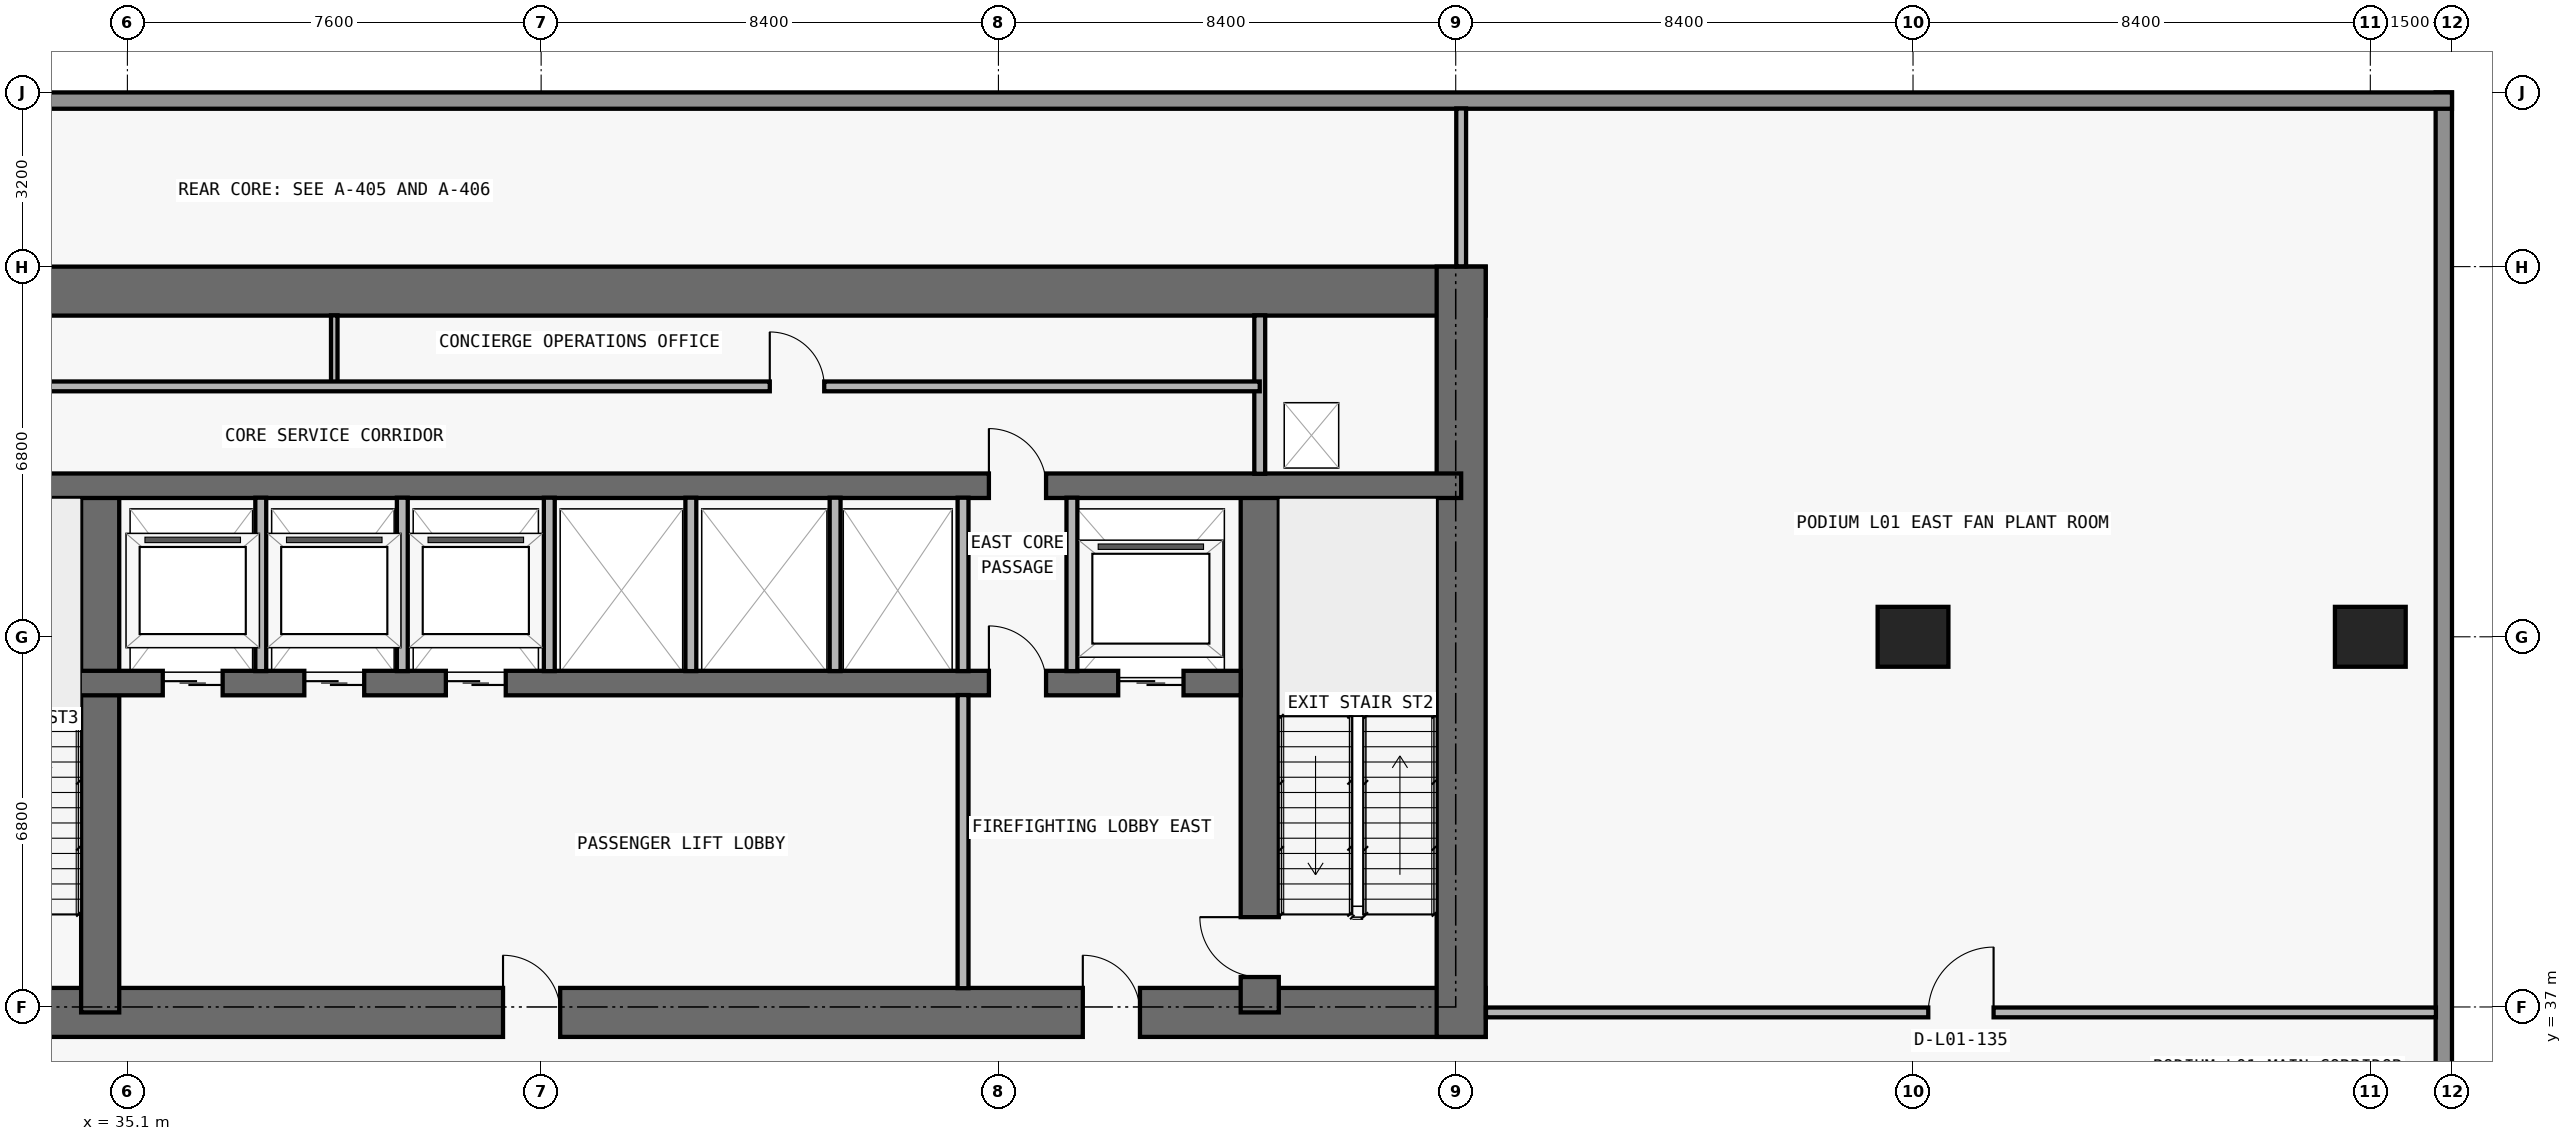
"""IFC4 building model, lengths in metres.
Left out: names, types, materials, properties, quantities, classifications, styles, units other than length and angle.
Written with IfcOpenShell. Run it as: python <this file> out.ifc"""

import sys

from ifc_helpers import new_model, si_unit, direction, frame, frame_2d, origin, origin_2d, place, context, subcontext, project, spatial, rectangle, extrude, element, fill, save


model = new_model("IFC4")
c1 = context("Model", 3, precision=1e-05, world=origin(), true_north=direction((0.0, 1.0)))
c2 = subcontext(c1, "Body", "Model", "MODEL_VIEW")
j1 = project(units=[si_unit("LENGTHUNIT", "METRE"), si_unit("PLANEANGLEUNIT", "RADIAN")], contexts=[c1])
p1 = place(None, origin())
s1 = spatial("IfcSite", under=j1, at=p1, CompositionType="ELEMENT")
p2 = place(p1, origin())
s2 = spatial("IfcBuilding", under=s1, at=p2, CompositionType="ELEMENT")
p3 = place(p2, frame((0.0, 0.0, 5.4)))
s3 = spatial("IfcBuildingStorey", under=s2, at=p3, CompositionType="ELEMENT", Elevation=5.4)
for number, where, z_axis, x_axis in (
    (1, (67.9, 43.8, 0.0), (0.0, 0.0, 1.0), (1.0, 0.0, 0.0)),
    (2, (76.3, 43.8, 0.0), (0.0, 0.0, 1.0), (1.0, 0.0, 0.0)),
):
    element("IfcColumn", number, at=place(p3, frame(where, z_axis=z_axis, x_axis=x_axis)), inside=s3, PredefinedType="COLUMN", context=c2, shape_type="SweptSolid", body=[
        extrude(rectangle(XDim=1.3, YDim=1.1, at=origin_2d()), origin(), (0.0, 0.0, 1.0), 4.5),
    ])
p4 = place(p3, frame((17.75, 36.9, 0.0), z_axis=(0.0, 0.0, 1.0), x_axis=(1.0, 0.0, 0.0)))
e3 = element("IfcWall", 3, at=p4, inside=s3, PredefinedType="SHEAR", context=c2, shape_type="SweptSolid", body=[
    extrude(rectangle(XDim=42.3, YDim=0.9, at=frame_2d((21.15, 0.0))), origin(), (0.0, 0.0, 1.0), 4.5),
])
p5 = place(p4, frame((14.55, 0.0, 0.0)))
e4 = element("IfcOpeningElement", 4, at=p5, cuts=e3, PredefinedType="OPENING", context=c2, shape_type="SweptSolid", body=[
    extrude(rectangle(XDim=1.1, YDim=2.15, at=frame_2d((0.55, 1.075))), frame((0.0, 0.46, 0.0), z_axis=(0.0, -1.0, 0.0), x_axis=(1.0, 0.0, 0.0)), (0.0, 0.0, 1.0), 0.92),
])
p6 = place(p4, frame((6.4, 0.0, 0.0)))
e5 = element("IfcOpeningElement", 5, at=p6, cuts=e3, PredefinedType="OPENING", context=c2, shape_type="SweptSolid", body=[
    extrude(rectangle(XDim=1.05, YDim=2.15, at=frame_2d((0.525, 1.075))), frame((0.0, 0.46, 0.0), z_axis=(0.0, -1.0, 0.0), x_axis=(1.0, 0.0, 0.0)), (0.0, 0.0, 1.0), 0.92),
])
p7 = place(p4, frame((34.9, 0.0, 0.0)))
e6 = element("IfcOpeningElement", 6, at=p7, cuts=e3, PredefinedType="OPENING", context=c2, shape_type="SweptSolid", body=[
    extrude(rectangle(XDim=1.05, YDim=2.15, at=frame_2d((0.525, 1.075))), frame((0.0, 0.46, 0.0), z_axis=(0.0, -1.0, 0.0), x_axis=(1.0, 0.0, 0.0)), (0.0, 0.0, 1.0), 0.92),
])
p8 = place(p4, frame((11.012, 0.0, 0.0)))
e7 = element("IfcOpeningElement", 7, at=p8, cuts=e3, PredefinedType="OPENING", context=c2, shape_type="SweptSolid", body=[
    extrude(rectangle(XDim=1.05, YDim=2.15, at=frame_2d((0.525, 1.075))), frame((0.0, 0.46, 0.0), z_axis=(0.0, -1.0, 0.0), x_axis=(1.0, 0.0, 0.0)), (0.0, 0.0, 1.0), 0.92),
])
p9 = place(p4, frame((24.25, 0.0, 0.0)))
e8 = element("IfcOpeningElement", 8, at=p9, cuts=e3, PredefinedType="OPENING", context=c2, shape_type="SweptSolid", body=[
    extrude(rectangle(XDim=1.05, YDim=2.15, at=frame_2d((0.525, 1.075))), frame((0.0, 0.46, 0.0), z_axis=(0.0, -1.0, 0.0), x_axis=(1.0, 0.0, 0.0)), (0.0, 0.0, 1.0), 0.92),
])
p10 = place(p3, frame((17.75, 50.15, 0.0), z_axis=(0.0, 0.0, 1.0), x_axis=(1.0, 0.0, 0.0)))
e9 = element("IfcWall", 9, at=p10, inside=s3, PredefinedType="SHEAR", context=c2, shape_type="SweptSolid", body=[
    extrude(rectangle(XDim=42.3, YDim=0.9, at=frame_2d((21.15, 0.0))), origin(), (0.0, 0.0, 1.0), 4.5),
])
p11 = place(p3, frame((59.6, 36.45, 0.0), z_axis=(0.0, 0.0, 1.0), x_axis=(0.0, 1.0, 0.0)))
e10 = element("IfcWall", 10, at=p11, inside=s3, PredefinedType="SHEAR", context=c2, shape_type="SweptSolid", body=[
    extrude(rectangle(XDim=14.15, YDim=0.9, at=frame_2d((7.075, 0.0))), origin(), (0.0, 0.0, 1.0), 4.5),
])
p12 = place(p3, frame((55.9, 36.9, 0.0), z_axis=(0.0, 0.0, 1.0), x_axis=(0.0, 1.0, 0.0)))
e11 = element("IfcWall", 11, at=p12, inside=s3, PredefinedType="SHEAR", context=c2, shape_type="SweptSolid", body=[
    extrude(rectangle(XDim=9.675, YDim=0.7, at=frame_2d((4.837, 0.0))), origin(), (0.0, 0.0, 1.0), 4.5),
])
p13 = place(p12, frame((0.65, 0.0, 0.0)))
e12 = element("IfcOpeningElement", 12, at=p13, cuts=e11, PredefinedType="OPENING", context=c2, shape_type="SweptSolid", body=[
    extrude(rectangle(XDim=1.1, YDim=2.15, at=frame_2d((0.55, 1.075))), frame((0.0, 0.36, 0.0), z_axis=(0.0, -1.0, 0.0), x_axis=(1.0, 0.0, 0.0)), (0.0, 0.0, 1.0), 0.72),
])
p14 = place(p3, frame((34.6, 36.9, 0.0), z_axis=(0.0, 0.0, 1.0), x_axis=(0.0, 1.0, 0.0)))
e13 = element("IfcWall", 13, at=p14, inside=s3, PredefinedType="SHEAR", context=c2, shape_type="SweptSolid", body=[
    extrude(rectangle(XDim=9.675, YDim=0.7, at=frame_2d((4.837, 0.0))), origin(), (0.0, 0.0, 1.0), 4.5),
])
p15 = place(p3, frame((22.25, 42.95, 0.0), z_axis=(0.0, 0.0, 1.0), x_axis=(1.0, 0.0, 0.0)))
e14 = element("IfcWall", 14, at=p15, inside=s3, PredefinedType="SHEAR", context=c2, shape_type="SweptSolid", body=[
    extrude(rectangle(XDim=33.3, YDim=0.45, at=frame_2d((16.65, 0.0))), origin(), (0.0, 0.0, 1.0), 4.5),
])
p16 = place(p15, frame((1.05, 0.0, 0.0)))
e15 = element("IfcOpeningElement", 15, at=p16, cuts=e14, PredefinedType="OPENING", context=c2, shape_type="SweptSolid", body=[
    extrude(rectangle(XDim=1.2, YDim=2.2, at=frame_2d((0.6, 1.1))), frame((0.0, 0.235, 0.0), z_axis=(0.0, -1.0, 0.0), x_axis=(1.0, 0.0, 0.0)), (0.0, 0.0, 1.0), 0.47),
])
p17 = place(p15, frame((31.05, 0.0, 0.0)))
e16 = element("IfcOpeningElement", 16, at=p17, cuts=e14, PredefinedType="OPENING", context=c2, shape_type="SweptSolid", body=[
    extrude(rectangle(XDim=1.2, YDim=2.2, at=frame_2d((0.6, 1.1))), frame((0.0, 0.235, 0.0), z_axis=(0.0, -1.0, 0.0), x_axis=(1.0, 0.0, 0.0)), (0.0, 0.0, 1.0), 0.47),
])
p18 = place(p15, frame((13.5, 0.0, 0.0)))
e17 = element("IfcOpeningElement", 17, at=p18, cuts=e14, PredefinedType="OPENING", context=c2, shape_type="SweptSolid", body=[
    extrude(rectangle(XDim=1.1, YDim=2.2, at=frame_2d((0.55, 1.1))), frame((0.0, 0.235, 0.0), z_axis=(0.0, -1.0, 0.0), x_axis=(1.0, 0.0, 0.0)), (0.0, 0.0, 1.0), 0.47),
])
p19 = place(p15, frame((16.1, 0.0, 0.0)))
e18 = element("IfcOpeningElement", 18, at=p19, cuts=e14, PredefinedType="OPENING", context=c2, shape_type="SweptSolid", body=[
    extrude(rectangle(XDim=1.1, YDim=2.2, at=frame_2d((0.55, 1.1))), frame((0.0, 0.235, 0.0), z_axis=(0.0, -1.0, 0.0), x_axis=(1.0, 0.0, 0.0)), (0.0, 0.0, 1.0), 0.47),
])
p20 = place(p15, frame((18.7, 0.0, 0.0)))
e19 = element("IfcOpeningElement", 19, at=p20, cuts=e14, PredefinedType="OPENING", context=c2, shape_type="SweptSolid", body=[
    extrude(rectangle(XDim=1.1, YDim=2.2, at=frame_2d((0.55, 1.1))), frame((0.0, 0.235, 0.0), z_axis=(0.0, -1.0, 0.0), x_axis=(1.0, 0.0, 0.0)), (0.0, 0.0, 1.0), 0.47),
])
p21 = place(p15, frame((3.625, 0.0, 0.0)))
e20 = element("IfcOpeningElement", 20, at=p21, cuts=e14, PredefinedType="OPENING", context=c2, shape_type="SweptSolid", body=[
    extrude(rectangle(XDim=1.05, YDim=2.15, at=frame_2d((0.525, 1.075))), frame((0.0, 0.235, 0.0), z_axis=(0.0, -1.0, 0.0), x_axis=(1.0, 0.0, 0.0)), (0.0, 0.0, 1.0), 0.47),
])
p22 = place(p15, frame((28.675, 0.0, 0.0)))
e21 = element("IfcOpeningElement", 21, at=p22, cuts=e14, PredefinedType="OPENING", context=c2, shape_type="SweptSolid", body=[
    extrude(rectangle(XDim=1.05, YDim=2.15, at=frame_2d((0.525, 1.075))), frame((0.0, 0.235, 0.0), z_axis=(0.0, -1.0, 0.0), x_axis=(1.0, 0.0, 0.0)), (0.0, 0.0, 1.0), 0.47),
])
p23 = place(p3, frame((18.2, 46.575, 0.0), z_axis=(0.0, 0.0, 1.0), x_axis=(1.0, 0.0, 0.0)))
e22 = element("IfcWall", 22, at=p23, inside=s3, PredefinedType="SHEAR", context=c2, shape_type="SweptSolid", body=[
    extrude(rectangle(XDim=41.4, YDim=0.45, at=frame_2d((20.7, 0.0))), origin(), (0.0, 0.0, 1.0), 4.5),
])
p24 = place(p23, frame((7.675, 0.0, 0.0)))
e23 = element("IfcOpeningElement", 23, at=p24, cuts=e22, PredefinedType="OPENING", context=c2, shape_type="SweptSolid", body=[
    extrude(rectangle(XDim=1.05, YDim=2.15, at=frame_2d((0.525, 1.075))), frame((0.0, 0.235, 0.0), z_axis=(0.0, -1.0, 0.0), x_axis=(1.0, 0.0, 0.0)), (0.0, 0.0, 1.0), 0.47),
])
p25 = place(p23, frame((32.725, 0.0, 0.0)))
e24 = element("IfcOpeningElement", 24, at=p25, cuts=e22, PredefinedType="OPENING", context=c2, shape_type="SweptSolid", body=[
    extrude(rectangle(XDim=1.05, YDim=2.15, at=frame_2d((0.525, 1.075))), frame((0.0, 0.235, 0.0), z_axis=(0.0, -1.0, 0.0), x_axis=(1.0, 0.0, 0.0)), (0.0, 0.0, 1.0), 0.47),
])
p26 = place(p3, frame((77.65, 53.8, 0.0), z_axis=(0.0, 0.0, 1.0), x_axis=(0.0, -1.0, 0.0)))
e25 = element("IfcWall", 25, at=p26, inside=s3, PredefinedType="STANDARD", context=c2, shape_type="SweptSolid", body=[
    extrude(rectangle(XDim=26.9, YDim=0.3, at=frame_2d((13.45, 0.0))), origin(), (0.0, 0.0, 1.0), 4.5),
])
p27 = place(p3, frame((0.0, 53.65, 0.0), z_axis=(0.0, 0.0, 1.0), x_axis=(1.0, 0.0, 0.0)))
e26 = element("IfcWall", 26, at=p27, inside=s3, PredefinedType="STANDARD", context=c2, shape_type="SweptSolid", body=[
    extrude(rectangle(XDim=77.8, YDim=0.3, at=frame_2d((38.9, 0.0))), origin(), (0.0, 0.0, 1.0), 4.5),
])
p28 = place(p3, frame((37.55, 43.17, 0.0), z_axis=(0.0, 0.0, 1.0), x_axis=(0.0, 1.0, 0.0)))
e27 = element("IfcWall", 27, at=p28, inside=s3, PredefinedType="PARTITIONING", context=c2, shape_type="SweptSolid", body=[
    extrude(rectangle(XDim=3.185, YDim=0.2, at=frame_2d((1.593, 0.0))), origin(), (0.0, 0.0, 1.0), 4.5),
])
p29 = place(p3, frame((38.9, 48.4, 0.0), z_axis=(0.0, 0.0, 1.0), x_axis=(0.0, 1.0, 0.0)))
e28 = element("IfcWall", 28, at=p29, inside=s3, PredefinedType="PARTITIONING", context=c2, shape_type="SweptSolid", body=[
    extrude(rectangle(XDim=1.305, YDim=0.12, at=frame_2d((0.653, 0.0))), origin(), (0.0, 0.0, 1.0), 4.5),
])
for number, where, z_axis, x_axis in (
    (29, (40.15, 43.17, 0.0), (0.0, 0.0, 1.0), (0.0, 1.0, 0.0)),
    (30, (42.85, 43.17, 0.0), (0.0, 0.0, 1.0), (0.0, 1.0, 0.0)),
    (31, (45.45, 43.17, 0.0), (0.0, 0.0, 1.0), (0.0, 1.0, 0.0)),
    (32, (48.1, 43.17, 0.0), (0.0, 0.0, 1.0), (0.0, 1.0, 0.0)),
):
    element("IfcWall", number, at=place(p3, frame(where, z_axis=z_axis, x_axis=x_axis)), inside=s3, PredefinedType="PARTITIONING", context=c2, shape_type="SweptSolid", body=[
        extrude(rectangle(XDim=3.185, YDim=0.2, at=frame_2d((1.593, 0.0))), origin(), (0.0, 0.0, 1.0), 4.5),
    ])
p30 = place(p3, frame((50.45, 37.345, 0.0), z_axis=(0.0, 0.0, 1.0), x_axis=(0.0, 1.0, 0.0)))
e33 = element("IfcWall", 33, at=p30, inside=s3, PredefinedType="PARTITIONING", context=c2, shape_type="SweptSolid", body=[
    extrude(rectangle(XDim=5.385, YDim=0.2, at=frame_2d((2.692, 0.0))), origin(), (0.0, 0.0, 1.0), 4.5),
])
for number, where, z_axis, x_axis in (
    (34, (50.45, 43.17, 0.0), (0.0, 0.0, 1.0), (0.0, 1.0, 0.0)),
    (35, (52.45, 43.17, 0.0), (0.0, 0.0, 1.0), (0.0, 1.0, 0.0)),
):
    element("IfcWall", number, at=place(p3, frame(where, z_axis=z_axis, x_axis=x_axis)), inside=s3, PredefinedType="PARTITIONING", context=c2, shape_type="SweptSolid", body=[
        extrude(rectangle(XDim=3.185, YDim=0.2, at=frame_2d((1.593, 0.0))), origin(), (0.0, 0.0, 1.0), 4.5),
    ])
p31 = place(p3, frame((55.9, 46.795, 0.0), z_axis=(0.0, 0.0, 1.0), x_axis=(0.0, 1.0, 0.0)))
e36 = element("IfcWall", 36, at=p31, inside=s3, PredefinedType="PARTITIONING", context=c2, shape_type="SweptSolid", body=[
    extrude(rectangle(XDim=2.91, YDim=0.2, at=frame_2d((1.455, 0.0))), origin(), (0.0, 0.0, 1.0), 4.5),
])
p32 = place(p3, frame((59.6, 50.605, 0.0), z_axis=(0.0, 0.0, 1.0), x_axis=(0.0, 1.0, 0.0)))
e37 = element("IfcWall", 37, at=p32, inside=s3, PredefinedType="PARTITIONING", context=c2, shape_type="SweptSolid", body=[
    extrude(rectangle(XDim=2.9, YDim=0.18, at=frame_2d((1.45, 0.0))), origin(), (0.0, 0.0, 1.0), 4.5),
])
p33 = place(p3, frame((60.055, 36.9, 0.0), z_axis=(0.0, 0.0, 1.0), x_axis=(1.0, 0.0, 0.0)))
e38 = element("IfcWall", 38, at=p33, inside=s3, PredefinedType="PARTITIONING", context=c2, shape_type="SweptSolid", body=[
    extrude(rectangle(XDim=17.45, YDim=0.18, at=frame_2d((8.725, 0.0))), origin(), (0.0, 0.0, 1.0), 4.5),
])
p34 = place(p33, frame((8.125, 0.0, 0.0)))
e39 = element("IfcOpeningElement", 39, at=p34, cuts=e38, PredefinedType="OPENING", context=c2, shape_type="SweptSolid", body=[
    extrude(rectangle(XDim=1.2, YDim=2.2, at=frame_2d((0.6, 1.1))), frame((0.0, 0.1, 0.0), z_axis=(0.0, -1.0, 0.0), x_axis=(1.0, 0.0, 0.0)), (0.0, 0.0, 1.0), 0.2),
])
p35 = place(p3, frame((21.9, 48.4, 0.0), z_axis=(0.0, 0.0, 1.0), x_axis=(1.0, 0.0, 0.0)))
e40 = element("IfcWall", 40, at=p35, inside=s3, PredefinedType="PARTITIONING", context=c2, shape_type="SweptSolid", body=[
    extrude(rectangle(XDim=34.0, YDim=0.18, at=frame_2d((17.0, 0.0))), origin(), (0.0, 0.0, 1.0), 4.5),
])
p36 = place(p35, frame((8.0, 0.0, 0.0)))
e41 = element("IfcOpeningElement", 41, at=p36, cuts=e40, PredefinedType="OPENING", context=c2, shape_type="SweptSolid", body=[
    extrude(rectangle(XDim=1.0, YDim=2.2, at=frame_2d((0.5, 1.1))), frame((0.0, 0.1, 0.0), z_axis=(0.0, -1.0, 0.0), x_axis=(1.0, 0.0, 0.0)), (0.0, 0.0, 1.0), 0.2),
])
p37 = place(p35, frame((25.0, 0.0, 0.0)))
e42 = element("IfcOpeningElement", 42, at=p37, cuts=e40, PredefinedType="OPENING", context=c2, shape_type="SweptSolid", body=[
    extrude(rectangle(XDim=1.0, YDim=2.2, at=frame_2d((0.5, 1.1))), frame((0.0, 0.1, 0.0), z_axis=(0.0, -1.0, 0.0), x_axis=(1.0, 0.0, 0.0)), (0.0, 0.0, 1.0), 0.2),
])
p38 = place(p17, origin())
e43 = element("IfcDoor", 43, at=p38, inside=s3, OperationType="DOUBLE_DOOR_SLIDING", PredefinedType="DOOR", context=c2, shape_type="SweptSolid", body=[
    extrude(rectangle(XDim=1.2, YDim=2.2, at=frame_2d((0.6, 1.1))), frame((0.0, 0.025, 0.0), z_axis=(0.0, -1.0, 0.0), x_axis=(1.0, 0.0, 0.0)), (0.0, 0.0, 1.0), 0.05),
])
fill(e16, e43)
p39 = place(p18, origin())
e44 = element("IfcDoor", 44, at=p39, inside=s3, OperationType="DOUBLE_DOOR_SLIDING", PredefinedType="DOOR", context=c2, shape_type="SweptSolid", body=[
    extrude(rectangle(XDim=1.1, YDim=2.2, at=frame_2d((0.55, 1.1))), frame((0.0, 0.025, 0.0), z_axis=(0.0, -1.0, 0.0), x_axis=(1.0, 0.0, 0.0)), (0.0, 0.0, 1.0), 0.05),
])
fill(e17, e44)
p40 = place(p19, origin())
e45 = element("IfcDoor", 45, at=p40, inside=s3, OperationType="DOUBLE_DOOR_SLIDING", PredefinedType="DOOR", context=c2, shape_type="SweptSolid", body=[
    extrude(rectangle(XDim=1.1, YDim=2.2, at=frame_2d((0.55, 1.1))), frame((0.0, 0.025, 0.0), z_axis=(0.0, -1.0, 0.0), x_axis=(1.0, 0.0, 0.0)), (0.0, 0.0, 1.0), 0.05),
])
fill(e18, e45)
p41 = place(p20, origin())
e46 = element("IfcDoor", 46, at=p41, inside=s3, OperationType="DOUBLE_DOOR_SLIDING", PredefinedType="DOOR", context=c2, shape_type="SweptSolid", body=[
    extrude(rectangle(XDim=1.1, YDim=2.2, at=frame_2d((0.55, 1.1))), frame((0.0, 0.025, 0.0), z_axis=(0.0, -1.0, 0.0), x_axis=(1.0, 0.0, 0.0)), (0.0, 0.0, 1.0), 0.05),
])
fill(e19, e46)
p42 = place(p7, origin())
e47 = element("IfcDoor", 47, at=p42, inside=s3, OperationType="SINGLE_SWING_LEFT", PredefinedType="DOOR", context=c2, shape_type="SweptSolid", body=[
    extrude(rectangle(XDim=1.05, YDim=2.15, at=frame_2d((0.525, 1.075))), frame((0.0, 0.025, 0.0), z_axis=(0.0, -1.0, 0.0), x_axis=(1.0, 0.0, 0.0)), (0.0, 0.0, 1.0), 0.05),
])
fill(e6, e47)
p43 = place(p13, origin())
e48 = element("IfcDoor", 48, at=p43, inside=s3, OperationType="SINGLE_SWING_RIGHT", PredefinedType="DOOR", context=c2, shape_type="SweptSolid", body=[
    extrude(rectangle(XDim=1.1, YDim=2.15, at=frame_2d((0.55, 1.075))), frame((0.0, 0.025, 0.0), z_axis=(0.0, -1.0, 0.0), x_axis=(1.0, 0.0, 0.0)), (0.0, 0.0, 1.0), 0.05),
])
fill(e12, e48)
p44 = place(p22, origin())
e49 = element("IfcDoor", 49, at=p44, inside=s3, OperationType="SINGLE_SWING_LEFT", PredefinedType="DOOR", context=c2, shape_type="SweptSolid", body=[
    extrude(rectangle(XDim=1.05, YDim=2.15, at=frame_2d((0.525, 1.075))), frame((0.0, 0.025, 0.0), z_axis=(0.0, -1.0, 0.0), x_axis=(1.0, 0.0, 0.0)), (0.0, 0.0, 1.0), 0.05),
])
fill(e21, e49)
p45 = place(p9, origin())
e50 = element("IfcDoor", 50, at=p45, inside=s3, OperationType="SINGLE_SWING_LEFT", PredefinedType="DOOR", context=c2, shape_type="SweptSolid", body=[
    extrude(rectangle(XDim=1.05, YDim=2.15, at=frame_2d((0.525, 1.075))), frame((0.0, 0.025, 0.0), z_axis=(0.0, -1.0, 0.0), x_axis=(1.0, 0.0, 0.0)), (0.0, 0.0, 1.0), 0.05),
])
fill(e8, e50)
p46 = place(p25, origin())
e51 = element("IfcDoor", 51, at=p46, inside=s3, OperationType="SINGLE_SWING_LEFT", PredefinedType="DOOR", context=c2, shape_type="SweptSolid", body=[
    extrude(rectangle(XDim=1.05, YDim=2.15, at=frame_2d((0.525, 1.075))), frame((0.0, 0.025, 0.0), z_axis=(0.0, -1.0, 0.0), x_axis=(1.0, 0.0, 0.0)), (0.0, 0.0, 1.0), 0.05),
])
fill(e24, e51)
p47 = place(p37, origin())
e52 = element("IfcDoor", 52, at=p47, inside=s3, OperationType="SINGLE_SWING_LEFT", PredefinedType="DOOR", context=c2, shape_type="SweptSolid", body=[
    extrude(rectangle(XDim=1.0, YDim=2.2, at=frame_2d((0.5, 1.1))), frame((0.0, 0.025, 0.0), z_axis=(0.0, -1.0, 0.0), x_axis=(1.0, 0.0, 0.0)), (0.0, 0.0, 1.0), 0.05),
])
fill(e42, e52)
p48 = place(p34, origin())
e53 = element("IfcDoor", 53, at=p48, inside=s3, OperationType="SINGLE_SWING_RIGHT", PredefinedType="DOOR", context=c2, shape_type="SweptSolid", body=[
    extrude(rectangle(XDim=1.2, YDim=2.2, at=frame_2d((0.6, 1.1))), frame((0.0, 0.025, 0.0), z_axis=(0.0, -1.0, 0.0), x_axis=(1.0, 0.0, 0.0)), (0.0, 0.0, 1.0), 0.05),
])
fill(e39, e53)
save(model, sys.argv[1])
